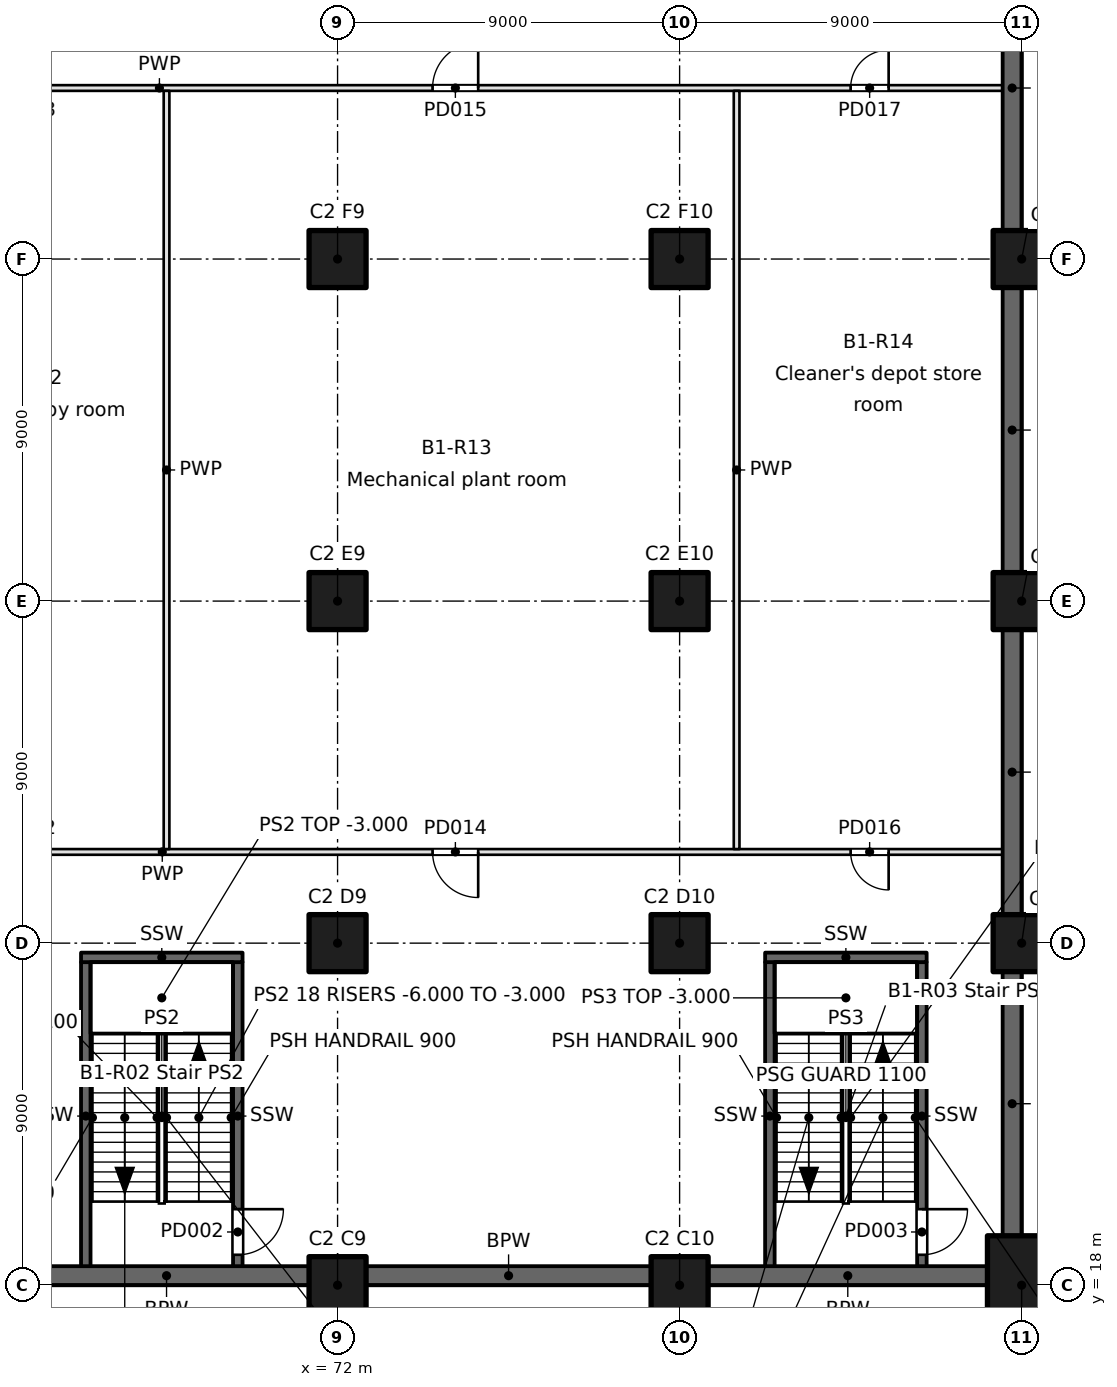
"""IFC4 building model, lengths in metres.
Left out: names, types, materials, properties, quantities, classifications, styles, units other than length and angle.
Written with IfcOpenShell. Run it as: python <this file> out.ifc"""

import sys

from ifc_helpers import new_model, si_unit, direction, frame, frame_2d, origin, origin_2d, place, context, subcontext, project, spatial, rectangle, extrude, element, fill, save


model = new_model("IFC4")
c1 = context("Model", 3, precision=1e-05, world=origin(), true_north=direction((0.0, 1.0)))
c2 = subcontext(c1, "Body", "Model", "MODEL_VIEW")
j1 = project(units=[si_unit("LENGTHUNIT", "METRE"), si_unit("PLANEANGLEUNIT", "RADIAN")], contexts=[c1])
p1 = place(None, origin())
s1 = spatial("IfcSite", under=j1, at=p1, CompositionType="ELEMENT")
p2 = place(p1, origin())
s2 = spatial("IfcBuilding", under=s1, at=p2, CompositionType="ELEMENT")
p3 = place(p2, frame((0.0, 0.0, -6.0)))
s3 = spatial("IfcBuildingStorey", under=s2, at=p3, CompositionType="ELEMENT", Elevation=-6.0)
for number, where, z_axis, x_axis in (
    (1, (72.0, 18.0, -0.6), (0.0, 0.0, 1.0), (1.0, 0.0, 0.0)),
    (2, (81.0, 18.0, -0.6), (0.0, 0.0, 1.0), (1.0, 0.0, 0.0)),
):
    element("IfcColumn", number, at=place(p3, frame(where, z_axis=z_axis, x_axis=x_axis)), inside=s3, PredefinedType="COLUMN", context=c2, shape_type="SweptSolid", body=[
        extrude(rectangle(XDim=1.5, YDim=1.5, at=origin_2d()), origin(), (0.0, 0.0, 1.0), 6.6),
    ])
p4 = place(p3, frame((90.0, 18.0, -0.6), z_axis=(0.0, 0.0, 1.0), x_axis=(0.0, 1.0, 0.0)))
e3 = element("IfcColumn", 3, at=p4, inside=s3, PredefinedType="COLUMN", context=c2, shape_type="SweptSolid", body=[
    extrude(rectangle(XDim=2.6, YDim=1.8, at=origin_2d()), origin(), (0.0, 0.0, 1.0), 6.6),
])
for number, where, z_axis, x_axis in (
    (4, (90.0, 27.0, -0.6), (0.0, 0.0, 1.0), (1.0, 0.0, 0.0)),
    (5, (90.0, 36.0, -0.6), (0.0, 0.0, 1.0), (1.0, 0.0, 0.0)),
    (6, (90.0, 45.0, -0.6), (0.0, 0.0, 1.0), (1.0, 0.0, 0.0)),
    (7, (72.0, 27.0, -0.6), (0.0, 0.0, 1.0), (1.0, 0.0, 0.0)),
    (8, (72.0, 36.0, -0.6), (0.0, 0.0, 1.0), (1.0, 0.0, 0.0)),
    (9, (72.0, 45.0, -0.6), (0.0, 0.0, 1.0), (1.0, 0.0, 0.0)),
    (10, (81.0, 27.0, -0.6), (0.0, 0.0, 1.0), (1.0, 0.0, 0.0)),
    (11, (81.0, 36.0, -0.6), (0.0, 0.0, 1.0), (1.0, 0.0, 0.0)),
    (12, (81.0, 45.0, -0.6), (0.0, 0.0, 1.0), (1.0, 0.0, 0.0)),
):
    element("IfcColumn", number, at=place(p3, frame(where, z_axis=z_axis, x_axis=x_axis)), inside=s3, PredefinedType="COLUMN", context=c2, shape_type="SweptSolid", body=[
        extrude(rectangle(XDim=1.5, YDim=1.5, at=origin_2d()), origin(), (0.0, 0.0, 1.0), 6.6),
    ])
p5 = place(p3, frame((65.375, 18.4, 0.0), z_axis=(0.0, 0.0, 1.0), x_axis=(0.0, 1.0, 0.0)))
e13 = element("IfcWall", 13, at=p5, inside=s3, PredefinedType="SOLIDWALL", context=c2, shape_type="SweptSolid", body=[
    extrude(rectangle(XDim=8.1, YDim=0.25, at=frame_2d((4.05, 0.0))), origin(), (0.0, 0.0, 1.0), 6.0),
])
p6 = place(p3, frame((69.375, 26.5, 0.0), z_axis=(0.0, 0.0, 1.0), x_axis=(0.0, -1.0, 0.0)))
e14 = element("IfcWall", 14, at=p6, inside=s3, PredefinedType="SOLIDWALL", context=c2, shape_type="SweptSolid", body=[
    extrude(rectangle(XDim=8.1, YDim=0.25, at=frame_2d((4.05, 0.0))), origin(), (0.0, 0.0, 1.0), 6.0),
])
p7 = place(p6, frame((6.5, 0.0, 0.0)))
e15 = element("IfcOpeningElement", 15, at=p7, cuts=e14, PredefinedType="OPENING", context=c2, shape_type="SweptSolid", body=[
    extrude(rectangle(XDim=1.2, YDim=2.1, at=frame_2d((0.6, 1.05))), frame((0.0, 0.125, 0.0), z_axis=(0.0, -1.0, 0.0), x_axis=(1.0, 0.0, 0.0)), (0.0, 0.0, 1.0), 0.25),
])
p8 = place(p3, frame((65.25, 26.625, 0.0), z_axis=(0.0, 0.0, 1.0), x_axis=(1.0, 0.0, 0.0)))
e16 = element("IfcWall", 16, at=p8, inside=s3, PredefinedType="SOLIDWALL", context=c2, shape_type="SweptSolid", body=[
    extrude(rectangle(XDim=4.25, YDim=0.25, at=frame_2d((2.125, 0.0))), origin(), (0.0, 0.0, 1.0), 6.0),
])
p9 = place(p3, frame((83.375, 18.4, 0.0), z_axis=(0.0, 0.0, 1.0), x_axis=(0.0, 1.0, 0.0)))
e17 = element("IfcWall", 17, at=p9, inside=s3, PredefinedType="SOLIDWALL", context=c2, shape_type="SweptSolid", body=[
    extrude(rectangle(XDim=8.1, YDim=0.25, at=frame_2d((4.05, 0.0))), origin(), (0.0, 0.0, 1.0), 6.0),
])
p10 = place(p3, frame((87.375, 26.5, 0.0), z_axis=(0.0, 0.0, 1.0), x_axis=(0.0, -1.0, 0.0)))
e18 = element("IfcWall", 18, at=p10, inside=s3, PredefinedType="SOLIDWALL", context=c2, shape_type="SweptSolid", body=[
    extrude(rectangle(XDim=8.1, YDim=0.25, at=frame_2d((4.05, 0.0))), origin(), (0.0, 0.0, 1.0), 6.0),
])
p11 = place(p10, frame((6.5, 0.0, 0.0)))
e19 = element("IfcOpeningElement", 19, at=p11, cuts=e18, PredefinedType="OPENING", context=c2, shape_type="SweptSolid", body=[
    extrude(rectangle(XDim=1.2, YDim=2.1, at=frame_2d((0.6, 1.05))), frame((0.0, 0.125, 0.0), z_axis=(0.0, -1.0, 0.0), x_axis=(1.0, 0.0, 0.0)), (0.0, 0.0, 1.0), 0.25),
])
p12 = place(p3, frame((83.25, 26.625, 0.0), z_axis=(0.0, 0.0, 1.0), x_axis=(1.0, 0.0, 0.0)))
e20 = element("IfcWall", 20, at=p12, inside=s3, PredefinedType="SOLIDWALL", context=c2, shape_type="SweptSolid", body=[
    extrude(rectangle(XDim=4.25, YDim=0.25, at=frame_2d((2.125, 0.0))), origin(), (0.0, 0.0, 1.0), 6.0),
])
for number, where, z_axis, x_axis in (
    (21, (63.75, 18.25, 0.0), (0.0, 0.0, 1.0), (1.0, 0.0, 0.0)),
    (22, (72.75, 18.25, 0.0), (0.0, 0.0, 1.0), (1.0, 0.0, 0.0)),
):
    element("IfcWall", number, at=place(p3, frame(where, z_axis=z_axis, x_axis=x_axis)), inside=s3, PredefinedType="SOLIDWALL", context=c2, shape_type="SweptSolid", body=[
        extrude(rectangle(XDim=7.5, YDim=0.5, at=frame_2d((3.75, 0.0))), origin(), (0.0, 0.0, 1.0), 5.6),
    ])
p13 = place(p3, frame((81.75, 18.25, 0.0), z_axis=(0.0, 0.0, 1.0), x_axis=(1.0, 0.0, 0.0)))
e23 = element("IfcWall", 23, at=p13, inside=s3, PredefinedType="SOLIDWALL", context=c2, shape_type="SweptSolid", body=[
    extrude(rectangle(XDim=7.35, YDim=0.5, at=frame_2d((3.675, 0.0))), origin(), (0.0, 0.0, 1.0), 5.6),
])
p14 = place(p3, frame((89.75, 19.3, 0.0), z_axis=(0.0, 0.0, 1.0), x_axis=(0.0, 1.0, 0.0)))
e24 = element("IfcWall", 24, at=p14, inside=s3, PredefinedType="SOLIDWALL", context=c2, shape_type="SweptSolid", body=[
    extrude(rectangle(XDim=6.95, YDim=0.5, at=frame_2d((3.475, 0.0))), origin(), (0.0, 0.0, 1.0), 5.6),
])
for number, where, z_axis, x_axis in (
    (25, (89.75, 27.75, 0.0), (0.0, 0.0, 1.0), (0.0, 1.0, 0.0)),
    (26, (89.75, 36.75, 0.0), (0.0, 0.0, 1.0), (0.0, 1.0, 0.0)),
    (27, (89.75, 45.75, 0.0), (0.0, 0.0, 1.0), (0.0, 1.0, 0.0)),
):
    element("IfcWall", number, at=place(p3, frame(where, z_axis=z_axis, x_axis=x_axis)), inside=s3, PredefinedType="SOLIDWALL", context=c2, shape_type="SweptSolid", body=[
        extrude(rectangle(XDim=7.5, YDim=0.5, at=frame_2d((3.75, 0.0))), origin(), (0.0, 0.0, 1.0), 5.6),
    ])
p15 = place(p3, frame((89.7, 29.4, 0.0), z_axis=(0.0, 0.0, 1.0), x_axis=(-1.0, 0.0, 0.0)))
e28 = element("IfcWall", 28, at=p15, inside=s3, PredefinedType="PARTITIONING", context=c2, shape_type="SweptSolid", body=[
    extrude(rectangle(XDim=44.625, YDim=0.15, at=frame_2d((22.312, 0.0))), origin(), (0.0, 0.0, 1.0), 5.6),
])
p16 = place(p15, frame((36.625, 0.0, 0.0)))
e29 = element("IfcOpeningElement", 29, at=p16, cuts=e28, PredefinedType="OPENING", context=c2, shape_type="SweptSolid", body=[
    extrude(rectangle(XDim=1.0, YDim=2.1, at=frame_2d((0.5, 1.05))), frame((0.0, 0.075, 0.0), z_axis=(0.0, -1.0, 0.0), x_axis=(1.0, 0.0, 0.0)), (0.0, 0.0, 1.0), 0.15),
])
p17 = place(p15, frame((25.45, 0.0, 0.0)))
e30 = element("IfcOpeningElement", 30, at=p17, cuts=e28, PredefinedType="OPENING", context=c2, shape_type="SweptSolid", body=[
    extrude(rectangle(XDim=1.0, YDim=2.1, at=frame_2d((0.5, 1.05))), frame((0.0, 0.075, 0.0), z_axis=(0.0, -1.0, 0.0), x_axis=(1.0, 0.0, 0.0)), (0.0, 0.0, 1.0), 0.15),
])
p18 = place(p15, frame((14.0, 0.0, 0.0)))
e31 = element("IfcOpeningElement", 31, at=p18, cuts=e28, PredefinedType="OPENING", context=c2, shape_type="SweptSolid", body=[
    extrude(rectangle(XDim=1.2, YDim=2.1, at=frame_2d((0.6, 1.05))), frame((0.0, 0.075, 0.0), z_axis=(0.0, -1.0, 0.0), x_axis=(1.0, 0.0, 0.0)), (0.0, 0.0, 1.0), 0.15),
])
p19 = place(p15, frame((3.2, 0.0, 0.0)))
e32 = element("IfcOpeningElement", 32, at=p19, cuts=e28, PredefinedType="OPENING", context=c2, shape_type="SweptSolid", body=[
    extrude(rectangle(XDim=1.0, YDim=2.1, at=frame_2d((0.5, 1.05))), frame((0.0, 0.075, 0.0), z_axis=(0.0, -1.0, 0.0), x_axis=(1.0, 0.0, 0.0)), (0.0, 0.0, 1.0), 0.15),
])
p20 = place(p3, frame((44.925, 49.5, 0.0), z_axis=(0.0, 0.0, 1.0), x_axis=(1.0, 0.0, 0.0)))
e33 = element("IfcWall", 33, at=p20, inside=s3, PredefinedType="PARTITIONING", context=c2, shape_type="SweptSolid", body=[
    extrude(rectangle(XDim=44.775, YDim=0.15, at=frame_2d((22.387, 0.0))), origin(), (0.0, 0.0, 1.0), 5.6),
])
p21 = place(p20, frame((7.075, 0.0, 0.0)))
e34 = element("IfcOpeningElement", 34, at=p21, cuts=e33, PredefinedType="OPENING", context=c2, shape_type="SweptSolid", body=[
    extrude(rectangle(XDim=1.0, YDim=2.1, at=frame_2d((0.5, 1.05))), frame((0.0, 0.075, 0.0), z_axis=(0.0, -1.0, 0.0), x_axis=(1.0, 0.0, 0.0)), (0.0, 0.0, 1.0), 0.15),
])
p22 = place(p20, frame((18.325, 0.0, 0.0)))
e35 = element("IfcOpeningElement", 35, at=p22, cuts=e33, PredefinedType="OPENING", context=c2, shape_type="SweptSolid", body=[
    extrude(rectangle(XDim=1.0, YDim=2.1, at=frame_2d((0.5, 1.05))), frame((0.0, 0.075, 0.0), z_axis=(0.0, -1.0, 0.0), x_axis=(1.0, 0.0, 0.0)), (0.0, 0.0, 1.0), 0.15),
])
p23 = place(p20, frame((29.575, 0.0, 0.0)))
e36 = element("IfcOpeningElement", 36, at=p23, cuts=e33, PredefinedType="OPENING", context=c2, shape_type="SweptSolid", body=[
    extrude(rectangle(XDim=1.2, YDim=2.1, at=frame_2d((0.6, 1.05))), frame((0.0, 0.075, 0.0), z_axis=(0.0, -1.0, 0.0), x_axis=(1.0, 0.0, 0.0)), (0.0, 0.0, 1.0), 0.15),
])
p24 = place(p20, frame((40.575, 0.0, 0.0)))
e37 = element("IfcOpeningElement", 37, at=p24, cuts=e33, PredefinedType="OPENING", context=c2, shape_type="SweptSolid", body=[
    extrude(rectangle(XDim=1.0, YDim=2.1, at=frame_2d((0.5, 1.05))), frame((0.0, 0.075, 0.0), z_axis=(0.0, -1.0, 0.0), x_axis=(1.0, 0.0, 0.0)), (0.0, 0.0, 1.0), 0.15),
])
for number, where, z_axis, x_axis in (
    (38, (67.5, 29.475, 0.0), (0.0, 0.0, 1.0), (0.0, 1.0, 0.0)),
    (39, (82.5, 29.475, 0.0), (0.0, 0.0, 1.0), (0.0, 1.0, 0.0)),
):
    element("IfcWall", number, at=place(p3, frame(where, z_axis=z_axis, x_axis=x_axis)), inside=s3, PredefinedType="PARTITIONING", context=c2, shape_type="SweptSolid", body=[
        extrude(rectangle(XDim=19.95, YDim=0.15, at=frame_2d((9.975, 0.0))), origin(), (0.0, 0.0, 1.0), 5.6),
    ])
p25 = place(p7, origin())
e40 = element("IfcDoor", 40, at=p25, inside=s3, OperationType="SINGLE_SWING_LEFT", PredefinedType="DOOR", context=c2, shape_type="SweptSolid", body=[
    extrude(rectangle(XDim=1.2, YDim=2.1, at=frame_2d((0.6, 1.05))), frame((0.0, 0.025, 0.0), z_axis=(0.0, -1.0, 0.0), x_axis=(1.0, 0.0, 0.0)), (0.0, 0.0, 1.0), 0.05),
])
fill(e15, e40)
p26 = place(p11, origin())
e41 = element("IfcDoor", 41, at=p26, inside=s3, OperationType="SINGLE_SWING_LEFT", PredefinedType="DOOR", context=c2, shape_type="SweptSolid", body=[
    extrude(rectangle(XDim=1.2, YDim=2.1, at=frame_2d((0.6, 1.05))), frame((0.0, 0.025, 0.0), z_axis=(0.0, -1.0, 0.0), x_axis=(1.0, 0.0, 0.0)), (0.0, 0.0, 1.0), 0.05),
])
fill(e19, e41)
p27 = place(p18, origin())
e42 = element("IfcDoor", 42, at=p27, inside=s3, OperationType="SINGLE_SWING_LEFT", PredefinedType="DOOR", context=c2, shape_type="SweptSolid", body=[
    extrude(rectangle(XDim=1.2, YDim=2.1, at=frame_2d((0.6, 1.05))), frame((0.0, 0.025, 0.0), z_axis=(0.0, -1.0, 0.0), x_axis=(1.0, 0.0, 0.0)), (0.0, 0.0, 1.0), 0.05),
])
fill(e31, e42)
p28 = place(p23, origin())
e43 = element("IfcDoor", 43, at=p28, inside=s3, OperationType="SINGLE_SWING_RIGHT", PredefinedType="DOOR", context=c2, shape_type="SweptSolid", body=[
    extrude(rectangle(XDim=1.2, YDim=2.1, at=frame_2d((0.6, 1.05))), frame((0.0, 0.025, 0.0), z_axis=(0.0, -1.0, 0.0), x_axis=(1.0, 0.0, 0.0)), (0.0, 0.0, 1.0), 0.05),
])
fill(e36, e43)
p29 = place(p19, origin())
e44 = element("IfcDoor", 44, at=p29, inside=s3, OperationType="SINGLE_SWING_LEFT", PredefinedType="DOOR", context=c2, shape_type="SweptSolid", body=[
    extrude(rectangle(XDim=1.0, YDim=2.1, at=frame_2d((0.5, 1.05))), frame((0.0, 0.025, 0.0), z_axis=(0.0, -1.0, 0.0), x_axis=(1.0, 0.0, 0.0)), (0.0, 0.0, 1.0), 0.05),
])
fill(e32, e44)
p30 = place(p24, origin())
e45 = element("IfcDoor", 45, at=p30, inside=s3, OperationType="SINGLE_SWING_RIGHT", PredefinedType="DOOR", context=c2, shape_type="SweptSolid", body=[
    extrude(rectangle(XDim=1.0, YDim=2.1, at=frame_2d((0.5, 1.05))), frame((0.0, 0.025, 0.0), z_axis=(0.0, -1.0, 0.0), x_axis=(1.0, 0.0, 0.0)), (0.0, 0.0, 1.0), 0.05),
])
fill(e37, e45)
save(model, sys.argv[1])
